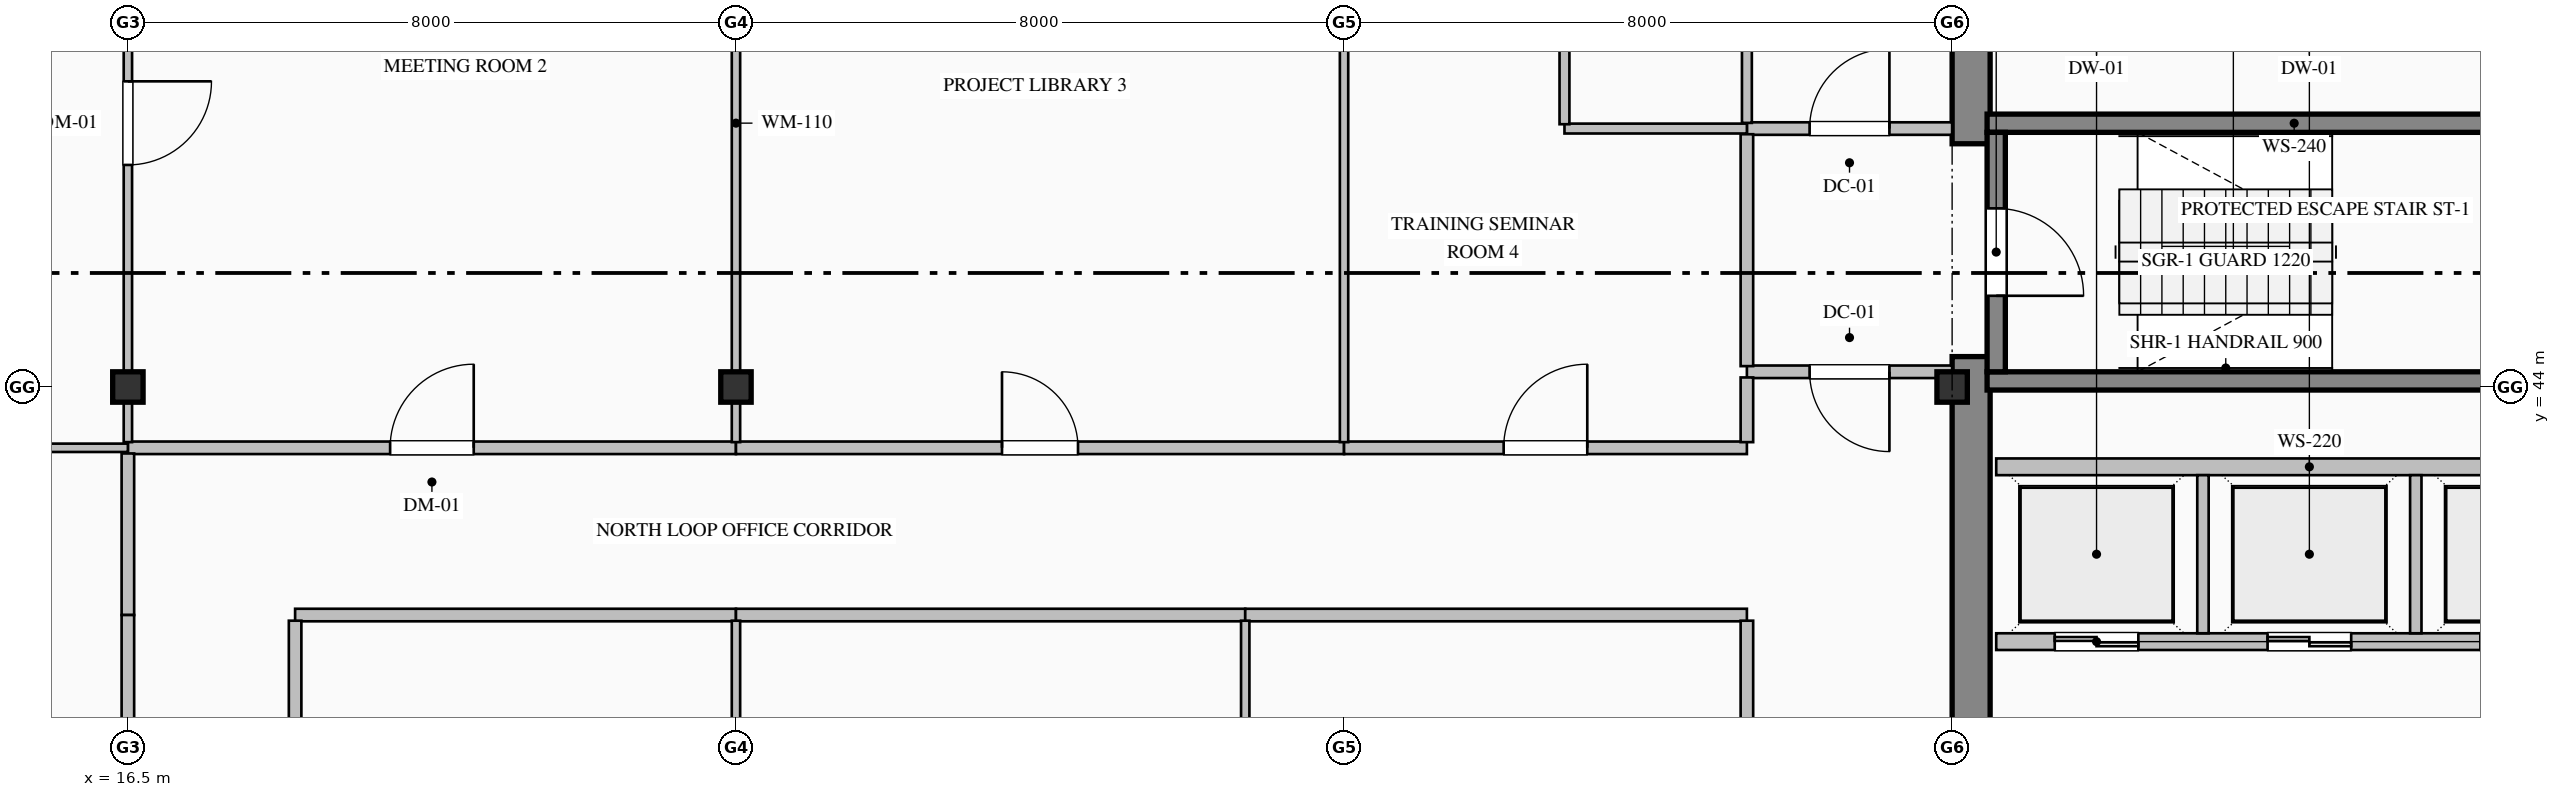
"""IFC4 building model, lengths in metres.
Left out: names, types, materials, properties, quantities, classifications, styles, units other than length and angle.
Written with IfcOpenShell. Run it as: python <this file> out.ifc"""

import sys

from ifc_helpers import new_model, si_unit, direction, frame, frame_2d, origin, origin_2d, place, context, subcontext, project, spatial, rectangle, i_section, extrude, element, fill, save


model = new_model("IFC4")
c1 = context("Model", 3, precision=1e-05, world=origin(), true_north=direction((0.0, 1.0)))
c2 = subcontext(c1, "Body", "Model", "MODEL_VIEW")
j1 = project(units=[si_unit("LENGTHUNIT", "METRE"), si_unit("PLANEANGLEUNIT", "RADIAN")], contexts=[c1])
p1 = place(None, origin())
s1 = spatial("IfcSite", under=j1, at=p1, CompositionType="ELEMENT")
p2 = place(p1, origin())
s2 = spatial("IfcBuilding", under=s1, at=p2, CompositionType="ELEMENT")
p3 = place(p2, frame((0.0, 0.0, 139.0)))
s3 = spatial("IfcBuildingStorey", under=s2, at=p3, CompositionType="ELEMENT", Elevation=139.0)
p4 = place(p3, frame((40.75, 36.5, 0.0), z_axis=(0.0, 0.0, 1.0), x_axis=(0.0, 1.0, 0.0)))
e1 = element("IfcWall", 1, at=p4, inside=s3, PredefinedType="SHEAR", context=c2, shape_type="SweptSolid", body=[
    extrude(rectangle(XDim=7.9, YDim=0.5, at=frame_2d((3.95, 0.0))), origin(), (0.0, 0.0, 1.0), 3.765),
])
p5 = place(p3, frame((40.75, 47.2, 0.0), z_axis=(0.0, 0.0, 1.0), x_axis=(0.0, 1.0, 0.0)))
e2 = element("IfcWall", 2, at=p5, inside=s3, PredefinedType="SHEAR", context=c2, shape_type="SweptSolid", body=[
    extrude(rectangle(XDim=4.3, YDim=0.5, at=frame_2d((2.15, 0.0))), origin(), (0.0, 0.0, 1.0), 3.765),
])
for number, where, z_axis, x_axis in (
    (3, (16.5, 44.0, 0.0), (0.0, 0.0, 1.0), (1.0, 0.0, 0.0)),
    (4, (24.5, 44.0, 0.0), (0.0, 0.0, 1.0), (1.0, 0.0, 0.0)),
    (5, (40.5, 44.0, 0.0), (0.0, 0.0, 1.0), (1.0, 0.0, 0.0)),
):
    element("IfcColumn", number, at=place(p3, frame(where, z_axis=z_axis, x_axis=x_axis)), inside=s3, PredefinedType="COLUMN", context=c2, shape_type="SweptSolid", body=[
        extrude(i_section(OverallWidth=0.4, OverallDepth=0.4, WebThickness=0.013, FlangeThickness=0.021, FilletRadius=0.022, at=origin_2d()), origin(), (0.0, 0.0, 1.0), 4.0),
    ])
for number, where, z_axis, x_axis in (
    (6, (40.96, 47.47, 0.0), (0.0, 0.0, 1.0), (1.0, 0.0, 0.0)),
    (7, (49.04, 44.08, 0.0), (0.0, 0.0, 1.0), (-1.0, 0.0, 0.0)),
):
    element("IfcWall", number, at=place(p3, frame(where, z_axis=z_axis, x_axis=x_axis)), inside=s3, PredefinedType="SOLIDWALL", context=c2, shape_type="SweptSolid", body=[
        extrude(rectangle(XDim=8.08, YDim=0.24, at=frame_2d((4.04, 0.0))), origin(), (0.0, 0.0, 1.0), 4.0),
    ])
p6 = place(p3, frame((41.08, 47.35, 0.0), z_axis=(0.0, 0.0, 1.0), x_axis=(0.0, -1.0, 0.0)))
e8 = element("IfcWall", 8, at=p6, inside=s3, PredefinedType="SOLIDWALL", context=c2, shape_type="SweptSolid", body=[
    extrude(rectangle(XDim=3.15, YDim=0.24, at=frame_2d((1.575, 0.0))), origin(), (0.0, 0.0, 1.0), 4.0),
])
p7 = place(p6, frame((1.0, 0.0, 0.0)))
e9 = element("IfcOpeningElement", 9, at=p7, cuts=e8, PredefinedType="OPENING", context=c2, shape_type="SweptSolid", body=[
    extrude(rectangle(XDim=1.15, YDim=2.2, at=frame_2d((0.575, 1.1))), frame((0.0, 0.13, 0.0), z_axis=(0.0, -1.0, 0.0), x_axis=(1.0, 0.0, 0.0)), (0.0, 0.0, 1.0), 0.26),
])
p8 = place(p3, frame((49.32, 40.65, 0.0), z_axis=(0.0, 0.0, 1.0), x_axis=(-1.0, 0.0, 0.0)))
e10 = element("IfcWall", 10, at=p8, inside=s3, PredefinedType="PARTITIONING", context=c2, shape_type="SweptSolid", body=[
    extrude(rectangle(XDim=8.24, YDim=0.22, at=frame_2d((4.12, 0.0))), origin(), (0.0, 0.0, 1.0), 3.765),
])
p9 = place(p8, frame((6.37, 0.0, 0.0)))
e11 = element("IfcOpeningElement", 11, at=p9, cuts=e10, PredefinedType="OPENING", context=c2, shape_type="SweptSolid", body=[
    extrude(rectangle(XDim=1.1, YDim=2.2, at=frame_2d((0.55, 1.1))), frame((0.0, 0.12, 0.0), z_axis=(0.0, -1.0, 0.0), x_axis=(1.0, 0.0, 0.0)), (0.0, 0.0, 1.0), 0.24),
])
p10 = place(p8, frame((3.57, 0.0, 0.0)))
e12 = element("IfcOpeningElement", 12, at=p10, cuts=e10, PredefinedType="OPENING", context=c2, shape_type="SweptSolid", body=[
    extrude(rectangle(XDim=1.1, YDim=2.2, at=frame_2d((0.55, 1.1))), frame((0.0, 0.12, 0.0), z_axis=(0.0, -1.0, 0.0), x_axis=(1.0, 0.0, 0.0)), (0.0, 0.0, 1.0), 0.24),
])
p11 = place(p8, frame((0.77, 0.0, 0.0)))
e13 = element("IfcOpeningElement", 13, at=p11, cuts=e10, PredefinedType="OPENING", context=c2, shape_type="SweptSolid", body=[
    extrude(rectangle(XDim=1.1, YDim=2.2, at=frame_2d((0.55, 1.1))), frame((0.0, 0.12, 0.0), z_axis=(0.0, -1.0, 0.0), x_axis=(1.0, 0.0, 0.0)), (0.0, 0.0, 1.0), 0.24),
])
p12 = place(p3, frame((41.08, 42.95, 0.0), z_axis=(0.0, 0.0, 1.0), x_axis=(1.0, 0.0, 0.0)))
e14 = element("IfcWall", 14, at=p12, inside=s3, PredefinedType="PARTITIONING", context=c2, shape_type="SweptSolid", body=[
    extrude(rectangle(XDim=8.24, YDim=0.22, at=frame_2d((4.12, 0.0))), origin(), (0.0, 0.0, 1.0), 3.765),
])
for number, where, z_axis, x_axis in (
    (15, (43.8, 40.76, 0.0), (0.0, 0.0, 1.0), (0.0, 1.0, 0.0)),
    (16, (46.6, 40.76, 0.0), (0.0, 0.0, 1.0), (0.0, 1.0, 0.0)),
):
    element("IfcWall", number, at=place(p3, frame(where, z_axis=z_axis, x_axis=x_axis)), inside=s3, PredefinedType="PARTITIONING", context=c2, shape_type="SweptSolid", body=[
        extrude(rectangle(XDim=2.08, YDim=0.15, at=frame_2d((1.04, 0.0))), origin(), (0.0, 0.0, 1.0), 3.765),
    ])
p13 = place(p3, frame((37.8, 47.4, 0.0), z_axis=(0.0, 0.0, 1.0), x_axis=(1.0, 0.0, 0.0)))
e17 = element("IfcWall", 17, at=p13, inside=s3, PredefinedType="PARTITIONING", context=c2, shape_type="SweptSolid", body=[
    extrude(rectangle(XDim=2.7, YDim=0.165, at=frame_2d((1.35, 0.0))), origin(), (0.0, 0.0, 1.0), 3.765),
])
p14 = place(p13, frame((0.825, 0.0, 0.0)))
e18 = element("IfcOpeningElement", 18, at=p14, cuts=e17, PredefinedType="OPENING", context=c2, shape_type="SweptSolid", body=[
    extrude(rectangle(XDim=1.05, YDim=2.15, at=frame_2d((0.525, 1.075))), frame((0.0, 0.093, 0.0), z_axis=(0.0, -1.0, 0.0), x_axis=(1.0, 0.0, 0.0)), (0.0, 0.0, 1.0), 0.185),
])
p15 = place(p3, frame((40.5, 44.2, 0.0), z_axis=(0.0, 0.0, 1.0), x_axis=(-1.0, 0.0, 0.0)))
e19 = element("IfcWall", 19, at=p15, inside=s3, PredefinedType="PARTITIONING", context=c2, shape_type="SweptSolid", body=[
    extrude(rectangle(XDim=2.7, YDim=0.165, at=frame_2d((1.35, 0.0))), origin(), (0.0, 0.0, 1.0), 3.765),
])
p16 = place(p15, frame((0.825, 0.0, 0.0)))
e20 = element("IfcOpeningElement", 20, at=p16, cuts=e19, PredefinedType="OPENING", context=c2, shape_type="SweptSolid", body=[
    extrude(rectangle(XDim=1.05, YDim=2.15, at=frame_2d((0.525, 1.075))), frame((0.0, 0.093, 0.0), z_axis=(0.0, -1.0, 0.0), x_axis=(1.0, 0.0, 0.0)), (0.0, 0.0, 1.0), 0.185),
])
p17 = place(p3, frame((37.8, 44.274, 0.0), z_axis=(0.0, 0.0, 1.0), x_axis=(0.0, 1.0, 0.0)))
e21 = element("IfcWall", 21, at=p17, inside=s3, PredefinedType="PARTITIONING", context=c2, shape_type="SweptSolid", body=[
    extrude(rectangle(XDim=3.051, YDim=0.165, at=frame_2d((1.525, 0.0))), origin(), (0.0, 0.0, 1.0), 3.765),
])
p18 = place(p3, frame((37.8, 47.475, 0.0), z_axis=(0.0, 0.0, 1.0), x_axis=(0.0, 1.0, 0.0)))
e22 = element("IfcWall", 22, at=p18, inside=s3, PredefinedType="PARTITIONING", context=c2, shape_type="SweptSolid", body=[
    extrude(rectangle(XDim=4.193, YDim=0.13, at=frame_2d((2.097, 0.0))), origin(), (0.0, 0.0, 1.0), 3.765),
])
p19 = place(p18, frame((1.587, 0.0, 0.0)))
e23 = element("IfcOpeningElement", 23, at=p19, cuts=e22, PredefinedType="OPENING", context=c2, shape_type="SweptSolid", body=[
    extrude(rectangle(XDim=1.02, YDim=2.15, at=frame_2d((0.51, 1.075))), frame((0.0, 0.075, 0.0), z_axis=(0.0, -1.0, 0.0), x_axis=(1.0, 0.0, 0.0)), (0.0, 0.0, 1.0), 0.15),
])
p20 = place(p3, frame((37.8, 47.4, 0.0), z_axis=(0.0, 0.0, 1.0), x_axis=(-1.0, 0.0, 0.0)))
e24 = element("IfcWall", 24, at=p20, inside=s3, PredefinedType="PARTITIONING", context=c2, shape_type="SweptSolid", body=[
    extrude(rectangle(XDim=2.4, YDim=0.13, at=frame_2d((1.2, 0.0))), origin(), (0.0, 0.0, 1.0), 3.765),
])
p21 = place(p3, frame((35.4, 47.457, 0.0), z_axis=(0.0, 0.0, 1.0), x_axis=(0.0, 1.0, 0.0)))
e25 = element("IfcWall", 25, at=p21, inside=s3, PredefinedType="PARTITIONING", context=c2, shape_type="SweptSolid", body=[
    extrude(rectangle(XDim=4.211, YDim=0.13, at=frame_2d((2.105, 0.0))), origin(), (0.0, 0.0, 1.0), 3.765),
])
p22 = place(p3, frame((16.5, 43.2, 0.0), z_axis=(0.0, 0.0, 1.0), x_axis=(1.0, 0.0, 0.0)))
e26 = element("IfcWall", 26, at=p22, inside=s3, PredefinedType="PARTITIONING", context=c2, shape_type="SweptSolid", body=[
    extrude(rectangle(XDim=8.0, YDim=0.165, at=frame_2d((4.0, 0.0))), origin(), (0.0, 0.0, 1.0), 3.765),
])
p23 = place(p22, frame((3.45, 0.0, 0.0)))
e27 = element("IfcOpeningElement", 27, at=p23, cuts=e26, PredefinedType="OPENING", context=c2, shape_type="SweptSolid", body=[
    extrude(rectangle(XDim=1.1, YDim=2.2, at=frame_2d((0.55, 1.1))), frame((0.0, 0.093, 0.0), z_axis=(0.0, -1.0, 0.0), x_axis=(1.0, 0.0, 0.0)), (0.0, 0.0, 1.0), 0.185),
])
p24 = place(p3, frame((24.5, 43.2, 0.0), z_axis=(0.0, 0.0, 1.0), x_axis=(1.0, 0.0, 0.0)))
e28 = element("IfcWall", 28, at=p24, inside=s3, PredefinedType="PARTITIONING", context=c2, shape_type="SweptSolid", body=[
    extrude(rectangle(XDim=8.0, YDim=0.165, at=frame_2d((4.0, 0.0))), origin(), (0.0, 0.0, 1.0), 3.765),
])
p25 = place(p24, frame((3.5, 0.0, 0.0)))
e29 = element("IfcOpeningElement", 29, at=p25, cuts=e28, PredefinedType="OPENING", context=c2, shape_type="SweptSolid", body=[
    extrude(rectangle(XDim=1.0, YDim=2.15, at=frame_2d((0.5, 1.075))), frame((0.0, 0.093, 0.0), z_axis=(0.0, -1.0, 0.0), x_axis=(1.0, 0.0, 0.0)), (0.0, 0.0, 1.0), 0.185),
])
p26 = place(p3, frame((32.5, 43.2, 0.0), z_axis=(0.0, 0.0, 1.0), x_axis=(1.0, 0.0, 0.0)))
e30 = element("IfcWall", 30, at=p26, inside=s3, PredefinedType="PARTITIONING", context=c2, shape_type="SweptSolid", body=[
    extrude(rectangle(XDim=5.3, YDim=0.165, at=frame_2d((2.65, 0.0))), origin(), (0.0, 0.0, 1.0), 3.765),
])
p27 = place(p26, frame((2.1, 0.0, 0.0)))
e31 = element("IfcOpeningElement", 31, at=p27, cuts=e30, PredefinedType="OPENING", context=c2, shape_type="SweptSolid", body=[
    extrude(rectangle(XDim=1.1, YDim=2.2, at=frame_2d((0.55, 1.1))), frame((0.0, 0.093, 0.0), z_axis=(0.0, -1.0, 0.0), x_axis=(1.0, 0.0, 0.0)), (0.0, 0.0, 1.0), 0.185),
])
p28 = place(p3, frame((24.5, 41.0, 0.0), z_axis=(0.0, 0.0, 1.0), x_axis=(-1.0, 0.0, 0.0)))
e32 = element("IfcWall", 32, at=p28, inside=s3, PredefinedType="PARTITIONING", context=c2, shape_type="SweptSolid", body=[
    extrude(rectangle(XDim=5.8, YDim=0.165, at=frame_2d((2.9, 0.0))), origin(), (0.0, 0.0, 1.0), 3.765),
])
p29 = place(p3, frame((31.2, 41.0, 0.0), z_axis=(0.0, 0.0, 1.0), x_axis=(-1.0, 0.0, 0.0)))
e33 = element("IfcWall", 33, at=p29, inside=s3, PredefinedType="PARTITIONING", context=c2, shape_type="SweptSolid", body=[
    extrude(rectangle(XDim=6.7, YDim=0.165, at=frame_2d((3.35, 0.0))), origin(), (0.0, 0.0, 1.0), 3.765),
])
p30 = place(p3, frame((37.8, 41.0, 0.0), z_axis=(0.0, 0.0, 1.0), x_axis=(-1.0, 0.0, 0.0)))
e34 = element("IfcWall", 34, at=p30, inside=s3, PredefinedType="PARTITIONING", context=c2, shape_type="SweptSolid", body=[
    extrude(rectangle(XDim=6.6, YDim=0.165, at=frame_2d((3.3, 0.0))), origin(), (0.0, 0.0, 1.0), 3.765),
])
p31 = place(p3, frame((16.5, 41.0, 0.0), z_axis=(0.0, 0.0, 1.0), x_axis=(0.0, 1.0, 0.0)))
e35 = element("IfcWall", 35, at=p31, inside=s3, PredefinedType="PARTITIONING", context=c2, shape_type="SweptSolid", body=[
    extrude(rectangle(XDim=2.125, YDim=0.165, at=frame_2d((1.063, 0.0))), origin(), (0.0, 0.0, 1.0), 3.157),
])
p32 = place(p3, frame((18.7, 40.926, 0.0), z_axis=(0.0, 0.0, 1.0), x_axis=(0.0, -1.0, 0.0)))
e36 = element("IfcWall", 36, at=p32, inside=s3, PredefinedType="PARTITIONING", context=c2, shape_type="SweptSolid", body=[
    extrude(rectangle(XDim=7.451, YDim=0.165, at=frame_2d((3.726, 0.0))), origin(), (0.0, 0.0, 1.0), 3.765),
])
p33 = place(p32, frame((3.176, 0.0, 0.0)))
e37 = element("IfcOpeningElement", 37, at=p33, cuts=e36, PredefinedType="OPENING", context=c2, shape_type="SweptSolid", body=[
    extrude(rectangle(XDim=1.1, YDim=2.2, at=frame_2d((0.55, 1.1))), frame((0.0, 0.093, 0.0), z_axis=(0.0, -1.0, 0.0), x_axis=(1.0, 0.0, 0.0)), (0.0, 0.0, 1.0), 0.185),
])
p34 = place(p3, frame((16.5, 33.4, 0.0), z_axis=(0.0, 0.0, 1.0), x_axis=(0.0, 1.0, 0.0)))
e38 = element("IfcWall", 38, at=p34, inside=s3, PredefinedType="PARTITIONING", context=c2, shape_type="SweptSolid", body=[
    extrude(rectangle(XDim=7.6, YDim=0.165, at=frame_2d((3.8, 0.0))), origin(), (0.0, 0.0, 1.0), 3.157),
])
p35 = place(p34, frame((3.3, 0.0, 0.0)))
e39 = element("IfcOpeningElement", 39, at=p35, cuts=e38, PredefinedType="OPENING", context=c2, shape_type="SweptSolid", body=[
    extrude(rectangle(XDim=1.0, YDim=2.15, at=frame_2d((0.5, 1.075))), frame((0.0, 0.093, 0.0), z_axis=(0.0, -1.0, 0.0), x_axis=(1.0, 0.0, 0.0)), (0.0, 0.0, 1.0), 0.185),
])
p36 = place(p3, frame((37.8, 43.274, 0.0), z_axis=(0.0, 0.0, 1.0), x_axis=(0.0, 1.0, 0.0)))
e40 = element("IfcWall", 40, at=p36, inside=s3, PredefinedType="PARTITIONING", context=c2, shape_type="SweptSolid", body=[
    extrude(rectangle(XDim=0.851, YDim=0.165, at=frame_2d((0.426, 0.0))), origin(), (0.0, 0.0, 1.0), 3.765),
])
p37 = place(p3, frame((37.8, 33.475, 0.0), z_axis=(0.0, 0.0, 1.0), x_axis=(0.0, 1.0, 0.0)))
e41 = element("IfcWall", 41, at=p37, inside=s3, PredefinedType="PARTITIONING", context=c2, shape_type="SweptSolid", body=[
    extrude(rectangle(XDim=7.451, YDim=0.165, at=frame_2d((3.726, 0.0))), origin(), (0.0, 0.0, 1.0), 3.765),
])
p38 = place(p37, frame((3.176, 0.0, 0.0)))
e42 = element("IfcOpeningElement", 42, at=p38, cuts=e41, PredefinedType="OPENING", context=c2, shape_type="SweptSolid", body=[
    extrude(rectangle(XDim=1.1, YDim=2.2, at=frame_2d((0.55, 1.1))), frame((0.0, 0.093, 0.0), z_axis=(0.0, -1.0, 0.0), x_axis=(1.0, 0.0, 0.0)), (0.0, 0.0, 1.0), 0.185),
])
p39 = place(p3, frame((16.5, 51.668, 0.0), z_axis=(0.0, 0.0, 1.0), x_axis=(0.0, -1.0, 0.0)))
e43 = element("IfcWall", 43, at=p39, inside=s3, PredefinedType="MOVABLE", context=c2, shape_type="SweptSolid", body=[
    extrude(rectangle(XDim=8.394, YDim=0.11, at=frame_2d((4.197, 0.0))), origin(), (0.0, 0.0, 1.0), 3.157),
])
p40 = place(p39, frame((3.647, 0.0, 0.0)))
e44 = element("IfcOpeningElement", 44, at=p40, cuts=e43, PredefinedType="OPENING", context=c2, shape_type="SweptSolid", body=[
    extrude(rectangle(XDim=1.1, YDim=2.2, at=frame_2d((0.55, 1.1))), frame((0.0, 0.065, 0.0), z_axis=(0.0, -1.0, 0.0), x_axis=(1.0, 0.0, 0.0)), (0.0, 0.0, 1.0), 0.13),
])
p41 = place(p3, frame((16.5, 43.2, 0.0), z_axis=(0.0, 0.0, 1.0), x_axis=(-1.0, 0.0, 0.0)))
e45 = element("IfcWall", 45, at=p41, inside=s3, PredefinedType="MOVABLE", context=c2, shape_type="SweptSolid", body=[
    extrude(rectangle(XDim=7.168, YDim=0.11, at=frame_2d((3.584, 0.0))), origin(), (0.0, 0.0, 1.0), 3.765),
])
p42 = place(p3, frame((24.5, 51.668, 0.0), z_axis=(0.0, 0.0, 1.0), x_axis=(0.0, -1.0, 0.0)))
e46 = element("IfcWall", 46, at=p42, inside=s3, PredefinedType="MOVABLE", context=c2, shape_type="SweptSolid", body=[
    extrude(rectangle(XDim=8.394, YDim=0.11, at=frame_2d((4.197, 0.0))), origin(), (0.0, 0.0, 1.0), 3.157),
])
p43 = place(p3, frame((32.5, 51.668, 0.0), z_axis=(0.0, 0.0, 1.0), x_axis=(0.0, -1.0, 0.0)))
e47 = element("IfcWall", 47, at=p43, inside=s3, PredefinedType="MOVABLE", context=c2, shape_type="SweptSolid", body=[
    extrude(rectangle(XDim=8.394, YDim=0.11, at=frame_2d((4.197, 0.0))), origin(), (0.0, 0.0, 1.0), 3.765),
])
p44 = place(p3, frame((24.5, 40.926, 0.0), z_axis=(0.0, 0.0, 1.0), x_axis=(0.0, -1.0, 0.0)))
e48 = element("IfcWall", 48, at=p44, inside=s3, PredefinedType="MOVABLE", context=c2, shape_type="SweptSolid", body=[
    extrude(rectangle(XDim=7.451, YDim=0.11, at=frame_2d((3.726, 0.0))), origin(), (0.0, 0.0, 1.0), 3.157),
])
p45 = place(p3, frame((31.2, 40.926, 0.0), z_axis=(0.0, 0.0, 1.0), x_axis=(0.0, -1.0, 0.0)))
e49 = element("IfcWall", 49, at=p45, inside=s3, PredefinedType="MOVABLE", context=c2, shape_type="SweptSolid", body=[
    extrude(rectangle(XDim=7.451, YDim=0.11, at=frame_2d((3.726, 0.0))), origin(), (0.0, 0.0, 1.0), 3.765),
])
p46 = place(p7, origin())
e50 = element("IfcDoor", 50, at=p46, inside=s3, OperationType="SINGLE_SWING_RIGHT", PredefinedType="DOOR", context=c2, shape_type="SweptSolid", body=[
    extrude(rectangle(XDim=1.15, YDim=2.2, at=frame_2d((0.575, 1.1))), frame((0.0, 0.025, 0.0), z_axis=(0.0, -1.0, 0.0), x_axis=(1.0, 0.0, 0.0)), (0.0, 0.0, 1.0), 0.05),
])
fill(e9, e50)
p47 = place(p9, origin())
e51 = element("IfcDoor", 51, at=p47, inside=s3, OperationType="DOUBLE_DOOR_SLIDING", PredefinedType="DOOR", context=c2, shape_type="SweptSolid", body=[
    extrude(rectangle(XDim=1.1, YDim=2.2, at=frame_2d((0.55, 1.1))), frame((0.0, 0.025, 0.0), z_axis=(0.0, -1.0, 0.0), x_axis=(1.0, 0.0, 0.0)), (0.0, 0.0, 1.0), 0.05),
])
fill(e11, e51)
p48 = place(p10, origin())
e52 = element("IfcDoor", 52, at=p48, inside=s3, OperationType="DOUBLE_DOOR_SLIDING", PredefinedType="DOOR", context=c2, shape_type="SweptSolid", body=[
    extrude(rectangle(XDim=1.1, YDim=2.2, at=frame_2d((0.55, 1.1))), frame((0.0, 0.025, 0.0), z_axis=(0.0, -1.0, 0.0), x_axis=(1.0, 0.0, 0.0)), (0.0, 0.0, 1.0), 0.05),
])
fill(e12, e52)
p49 = place(p14, origin())
e53 = element("IfcDoor", 53, at=p49, inside=s3, OperationType="SINGLE_SWING_RIGHT", PredefinedType="DOOR", context=c2, shape_type="SweptSolid", body=[
    extrude(rectangle(XDim=1.05, YDim=2.15, at=frame_2d((0.525, 1.075))), frame((0.0, 0.025, 0.0), z_axis=(0.0, -1.0, 0.0), x_axis=(1.0, 0.0, 0.0)), (0.0, 0.0, 1.0), 0.05),
])
fill(e18, e53)
p50 = place(p16, origin())
e54 = element("IfcDoor", 54, at=p50, inside=s3, OperationType="SINGLE_SWING_LEFT", PredefinedType="DOOR", context=c2, shape_type="SweptSolid", body=[
    extrude(rectangle(XDim=1.05, YDim=2.15, at=frame_2d((0.525, 1.075))), frame((0.0, 0.025, 0.0), z_axis=(0.0, -1.0, 0.0), x_axis=(1.0, 0.0, 0.0)), (0.0, 0.0, 1.0), 0.05),
])
fill(e20, e54)
p51 = place(p40, origin())
e55 = element("IfcDoor", 55, at=p51, inside=s3, OperationType="SINGLE_SWING_LEFT", PredefinedType="DOOR", context=c2, shape_type="SweptSolid", body=[
    extrude(rectangle(XDim=1.1, YDim=2.2, at=frame_2d((0.55, 1.1))), frame((0.0, 0.025, 0.0), z_axis=(0.0, -1.0, 0.0), x_axis=(1.0, 0.0, 0.0)), (0.0, 0.0, 1.0), 0.05),
])
fill(e44, e55)
p52 = place(p23, origin())
e56 = element("IfcDoor", 56, at=p52, inside=s3, OperationType="SINGLE_SWING_RIGHT", PredefinedType="DOOR", context=c2, shape_type="SweptSolid", body=[
    extrude(rectangle(XDim=1.1, YDim=2.2, at=frame_2d((0.55, 1.1))), frame((0.0, 0.025, 0.0), z_axis=(0.0, -1.0, 0.0), x_axis=(1.0, 0.0, 0.0)), (0.0, 0.0, 1.0), 0.05),
])
fill(e27, e56)
p53 = place(p25, origin())
e57 = element("IfcDoor", 57, at=p53, inside=s3, OperationType="SINGLE_SWING_LEFT", PredefinedType="DOOR", context=c2, shape_type="SweptSolid", body=[
    extrude(rectangle(XDim=1.0, YDim=2.15, at=frame_2d((0.5, 1.075))), frame((0.0, 0.025, 0.0), z_axis=(0.0, -1.0, 0.0), x_axis=(1.0, 0.0, 0.0)), (0.0, 0.0, 1.0), 0.05),
])
fill(e29, e57)
p54 = place(p27, origin())
e58 = element("IfcDoor", 58, at=p54, inside=s3, OperationType="SINGLE_SWING_RIGHT", PredefinedType="DOOR", context=c2, shape_type="SweptSolid", body=[
    extrude(rectangle(XDim=1.1, YDim=2.2, at=frame_2d((0.55, 1.1))), frame((0.0, 0.025, 0.0), z_axis=(0.0, -1.0, 0.0), x_axis=(1.0, 0.0, 0.0)), (0.0, 0.0, 1.0), 0.05),
])
fill(e31, e58)
save(model, sys.argv[1])
